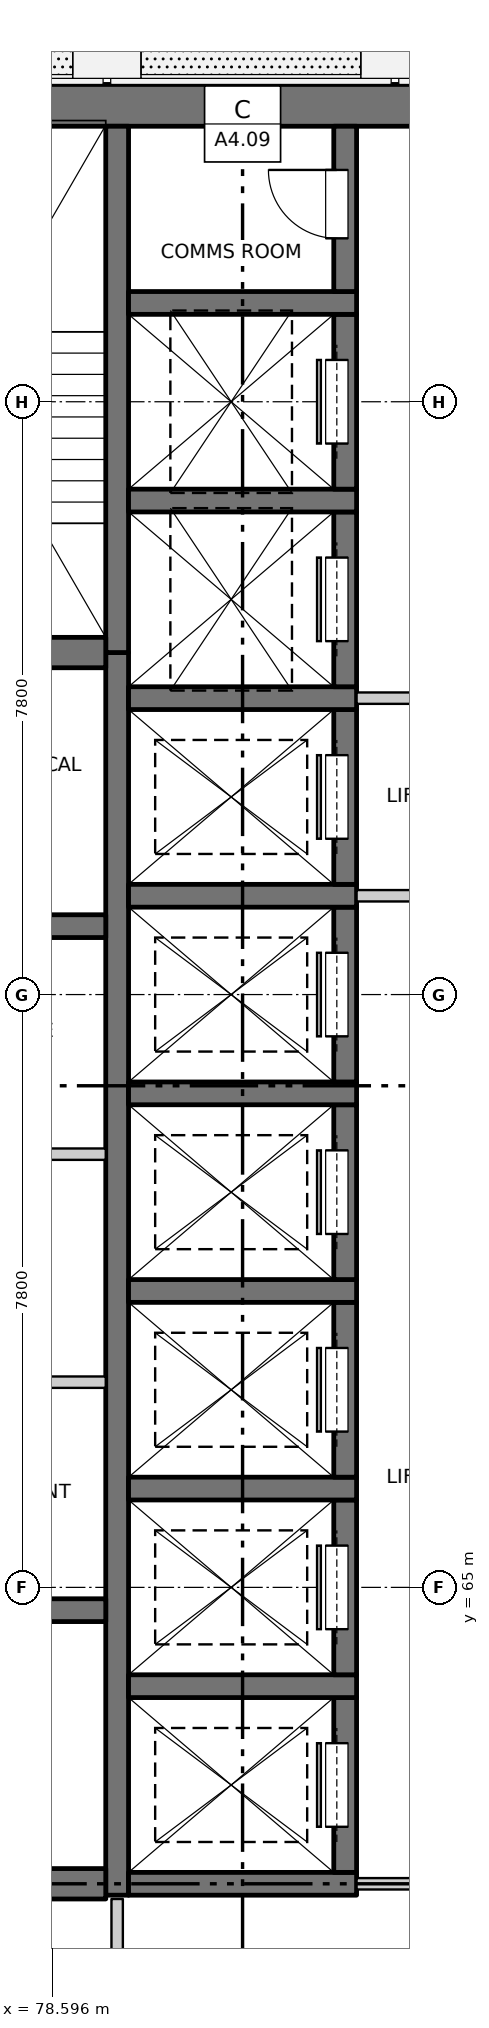
"""IFC4 building model, lengths in metres.
Left out: names, types, materials, properties, quantities, classifications, styles, units other than length and angle.
Written with IfcOpenShell. Run it as: python <this file> out.ifc"""

import sys

from ifc_helpers import new_model, si_unit, direction, frame, frame_2d, origin, place, context, subcontext, project, spatial, rectangle, extrude, element, fill, save


model = new_model("IFC4")
c1 = context("Model", 3, precision=1e-05, world=origin(), true_north=direction((0.0, 1.0)))
c2 = subcontext(c1, "Body", "Model", "MODEL_VIEW")
j1 = project(units=[si_unit("LENGTHUNIT", "METRE"), si_unit("PLANEANGLEUNIT", "RADIAN")], contexts=[c1])
p1 = place(None, origin())
s1 = spatial("IfcSite", under=j1, at=p1, CompositionType="ELEMENT")
p2 = place(p1, origin())
s2 = spatial("IfcBuilding", under=s1, at=p2, CompositionType="ELEMENT")
p3 = place(p2, frame((0.0, 0.0, 103.3)))
s3 = spatial("IfcBuildingStorey", under=s2, at=p3, CompositionType="ELEMENT", Elevation=103.3)
p4 = place(p3, frame((75.525, 84.5, -0.25), z_axis=(0.0, 0.0, 1.0), x_axis=(1.0, 0.0, 0.0)))
e1 = element("IfcWall", 1, at=p4, inside=s3, PredefinedType="SOLIDWALL", context=c2, shape_type="SweptSolid", body=[
    extrude(rectangle(XDim=18.95, YDim=0.55, at=frame_2d((9.475, 0.0))), origin(), (0.0, 0.0, 1.0), 3.4),
])
p5 = place(p3, frame((79.45, 60.95, -0.25), z_axis=(0.0, 0.0, 1.0), x_axis=(0.0, 1.0, 0.0)))
e2 = element("IfcWall", 2, at=p5, inside=s3, PredefinedType="SOLIDWALL", context=c2, shape_type="SweptSolid", body=[
    extrude(rectangle(XDim=16.35, YDim=0.3, at=frame_2d((8.175, 0.0))), origin(), (0.0, 0.0, 1.0), 3.4),
])
p6 = place(p3, frame((79.45, 77.3, -0.25), z_axis=(0.0, 0.0, 1.0), x_axis=(0.0, 1.0, 0.0)))
e3 = element("IfcWall", 3, at=p6, inside=s3, PredefinedType="SOLIDWALL", context=c2, shape_type="SweptSolid", body=[
    extrude(rectangle(XDim=6.925, YDim=0.3, at=frame_2d((3.462, 0.0))), origin(), (0.0, 0.0, 1.0), 3.4),
])
p7 = place(p3, frame((79.6, 61.1, -0.25), z_axis=(0.0, 0.0, 1.0), x_axis=(1.0, 0.0, 0.0)))
e4 = element("IfcWall", 4, at=p7, inside=s3, PredefinedType="SOLIDWALL", context=c2, shape_type="SweptSolid", body=[
    extrude(rectangle(XDim=3.0, YDim=0.3, at=frame_2d((1.5, 0.0))), origin(), (0.0, 0.0, 1.0), 3.4),
])
p8 = place(p3, frame((82.45, 61.25, -0.25), z_axis=(0.0, 0.0, 1.0), x_axis=(0.0, 1.0, 0.0)))
e5 = element("IfcWall", 5, at=p8, inside=s3, PredefinedType="SOLIDWALL", context=c2, shape_type="SweptSolid", body=[
    extrude(rectangle(XDim=2.3, YDim=0.3, at=frame_2d((1.15, 0.0))), origin(), (0.0, 0.0, 1.0), 3.4),
])
p9 = place(p8, frame((0.6, 0.0, 0.25)))
e6 = element("IfcOpeningElement", 6, at=p9, cuts=e5, PredefinedType="OPENING", context=c2, shape_type="SweptSolid", body=[
    extrude(rectangle(XDim=1.1, YDim=2.1, at=frame_2d((0.55, 1.05))), frame((0.0, 0.16, 0.0), z_axis=(0.0, -1.0, 0.0), x_axis=(1.0, 0.0, 0.0)), (0.0, 0.0, 1.0), 0.32),
])
p10 = place(p3, frame((79.6, 63.7, -0.25), z_axis=(0.0, 0.0, 1.0), x_axis=(1.0, 0.0, 0.0)))
e7 = element("IfcWall", 7, at=p10, inside=s3, PredefinedType="SOLIDWALL", context=c2, shape_type="SweptSolid", body=[
    extrude(rectangle(XDim=3.0, YDim=0.3, at=frame_2d((1.5, 0.0))), origin(), (0.0, 0.0, 1.0), 3.4),
])
p11 = place(p3, frame((82.45, 63.85, -0.25), z_axis=(0.0, 0.0, 1.0), x_axis=(0.0, 1.0, 0.0)))
e8 = element("IfcWall", 8, at=p11, inside=s3, PredefinedType="SOLIDWALL", context=c2, shape_type="SweptSolid", body=[
    extrude(rectangle(XDim=2.3, YDim=0.3, at=frame_2d((1.15, 0.0))), origin(), (0.0, 0.0, 1.0), 3.4),
])
p12 = place(p11, frame((0.6, 0.0, 0.25)))
e9 = element("IfcOpeningElement", 9, at=p12, cuts=e8, PredefinedType="OPENING", context=c2, shape_type="SweptSolid", body=[
    extrude(rectangle(XDim=1.1, YDim=2.1, at=frame_2d((0.55, 1.05))), frame((0.0, 0.16, 0.0), z_axis=(0.0, -1.0, 0.0), x_axis=(1.0, 0.0, 0.0)), (0.0, 0.0, 1.0), 0.32),
])
p13 = place(p3, frame((79.6, 66.3, -0.25), z_axis=(0.0, 0.0, 1.0), x_axis=(1.0, 0.0, 0.0)))
e10 = element("IfcWall", 10, at=p13, inside=s3, PredefinedType="SOLIDWALL", context=c2, shape_type="SweptSolid", body=[
    extrude(rectangle(XDim=3.0, YDim=0.3, at=frame_2d((1.5, 0.0))), origin(), (0.0, 0.0, 1.0), 3.4),
])
p14 = place(p3, frame((82.45, 66.45, -0.25), z_axis=(0.0, 0.0, 1.0), x_axis=(0.0, 1.0, 0.0)))
e11 = element("IfcWall", 11, at=p14, inside=s3, PredefinedType="SOLIDWALL", context=c2, shape_type="SweptSolid", body=[
    extrude(rectangle(XDim=2.3, YDim=0.3, at=frame_2d((1.15, 0.0))), origin(), (0.0, 0.0, 1.0), 3.4),
])
p15 = place(p14, frame((0.6, 0.0, 0.25)))
e12 = element("IfcOpeningElement", 12, at=p15, cuts=e11, PredefinedType="OPENING", context=c2, shape_type="SweptSolid", body=[
    extrude(rectangle(XDim=1.1, YDim=2.1, at=frame_2d((0.55, 1.05))), frame((0.0, 0.16, 0.0), z_axis=(0.0, -1.0, 0.0), x_axis=(1.0, 0.0, 0.0)), (0.0, 0.0, 1.0), 0.32),
])
p16 = place(p3, frame((79.6, 68.9, -0.25), z_axis=(0.0, 0.0, 1.0), x_axis=(1.0, 0.0, 0.0)))
e13 = element("IfcWall", 13, at=p16, inside=s3, PredefinedType="SOLIDWALL", context=c2, shape_type="SweptSolid", body=[
    extrude(rectangle(XDim=3.0, YDim=0.3, at=frame_2d((1.5, 0.0))), origin(), (0.0, 0.0, 1.0), 3.4),
])
p17 = place(p3, frame((82.45, 69.05, -0.25), z_axis=(0.0, 0.0, 1.0), x_axis=(0.0, 1.0, 0.0)))
e14 = element("IfcWall", 14, at=p17, inside=s3, PredefinedType="SOLIDWALL", context=c2, shape_type="SweptSolid", body=[
    extrude(rectangle(XDim=2.3, YDim=0.3, at=frame_2d((1.15, 0.0))), origin(), (0.0, 0.0, 1.0), 3.4),
])
p18 = place(p17, frame((0.6, 0.0, 0.25)))
e15 = element("IfcOpeningElement", 15, at=p18, cuts=e14, PredefinedType="OPENING", context=c2, shape_type="SweptSolid", body=[
    extrude(rectangle(XDim=1.1, YDim=2.1, at=frame_2d((0.55, 1.05))), frame((0.0, 0.16, 0.0), z_axis=(0.0, -1.0, 0.0), x_axis=(1.0, 0.0, 0.0)), (0.0, 0.0, 1.0), 0.32),
])
p19 = place(p3, frame((79.6, 71.5, -0.25), z_axis=(0.0, 0.0, 1.0), x_axis=(1.0, 0.0, 0.0)))
e16 = element("IfcWall", 16, at=p19, inside=s3, PredefinedType="SOLIDWALL", context=c2, shape_type="SweptSolid", body=[
    extrude(rectangle(XDim=3.0, YDim=0.3, at=frame_2d((1.5, 0.0))), origin(), (0.0, 0.0, 1.0), 3.4),
])
p20 = place(p3, frame((82.45, 71.65, -0.25), z_axis=(0.0, 0.0, 1.0), x_axis=(0.0, 1.0, 0.0)))
e17 = element("IfcWall", 17, at=p20, inside=s3, PredefinedType="SOLIDWALL", context=c2, shape_type="SweptSolid", body=[
    extrude(rectangle(XDim=2.3, YDim=0.3, at=frame_2d((1.15, 0.0))), origin(), (0.0, 0.0, 1.0), 3.4),
])
p21 = place(p20, frame((0.6, 0.0, 0.25)))
e18 = element("IfcOpeningElement", 18, at=p21, cuts=e17, PredefinedType="OPENING", context=c2, shape_type="SweptSolid", body=[
    extrude(rectangle(XDim=1.1, YDim=2.1, at=frame_2d((0.55, 1.05))), frame((0.0, 0.16, 0.0), z_axis=(0.0, -1.0, 0.0), x_axis=(1.0, 0.0, 0.0)), (0.0, 0.0, 1.0), 0.32),
])
p22 = place(p3, frame((79.6, 74.1, -0.25), z_axis=(0.0, 0.0, 1.0), x_axis=(1.0, 0.0, 0.0)))
e19 = element("IfcWall", 19, at=p22, inside=s3, PredefinedType="SOLIDWALL", context=c2, shape_type="SweptSolid", body=[
    extrude(rectangle(XDim=3.0, YDim=0.3, at=frame_2d((1.5, 0.0))), origin(), (0.0, 0.0, 1.0), 3.4),
])
p23 = place(p3, frame((82.45, 74.25, -0.25), z_axis=(0.0, 0.0, 1.0), x_axis=(0.0, 1.0, 0.0)))
e20 = element("IfcWall", 20, at=p23, inside=s3, PredefinedType="SOLIDWALL", context=c2, shape_type="SweptSolid", body=[
    extrude(rectangle(XDim=2.3, YDim=0.3, at=frame_2d((1.15, 0.0))), origin(), (0.0, 0.0, 1.0), 3.4),
])
p24 = place(p23, frame((0.6, 0.0, 0.25)))
e21 = element("IfcOpeningElement", 21, at=p24, cuts=e20, PredefinedType="OPENING", context=c2, shape_type="SweptSolid", body=[
    extrude(rectangle(XDim=1.1, YDim=2.1, at=frame_2d((0.55, 1.05))), frame((0.0, 0.16, 0.0), z_axis=(0.0, -1.0, 0.0), x_axis=(1.0, 0.0, 0.0)), (0.0, 0.0, 1.0), 0.32),
])
p25 = place(p3, frame((79.6, 76.7, -0.25), z_axis=(0.0, 0.0, 1.0), x_axis=(1.0, 0.0, 0.0)))
e22 = element("IfcWall", 22, at=p25, inside=s3, PredefinedType="SOLIDWALL", context=c2, shape_type="SweptSolid", body=[
    extrude(rectangle(XDim=3.0, YDim=0.3, at=frame_2d((1.5, 0.0))), origin(), (0.0, 0.0, 1.0), 3.4),
])
p26 = place(p3, frame((82.45, 76.85, -0.25), z_axis=(0.0, 0.0, 1.0), x_axis=(0.0, 1.0, 0.0)))
e23 = element("IfcWall", 23, at=p26, inside=s3, PredefinedType="SOLIDWALL", context=c2, shape_type="SweptSolid", body=[
    extrude(rectangle(XDim=2.3, YDim=0.3, at=frame_2d((1.15, 0.0))), origin(), (0.0, 0.0, 1.0), 3.4),
])
p27 = place(p26, frame((0.6, 0.0, 0.25)))
e24 = element("IfcOpeningElement", 24, at=p27, cuts=e23, PredefinedType="OPENING", context=c2, shape_type="SweptSolid", body=[
    extrude(rectangle(XDim=1.1, YDim=2.1, at=frame_2d((0.55, 1.05))), frame((0.0, 0.16, 0.0), z_axis=(0.0, -1.0, 0.0), x_axis=(1.0, 0.0, 0.0)), (0.0, 0.0, 1.0), 0.32),
])
p28 = place(p3, frame((79.6, 79.3, -0.25), z_axis=(0.0, 0.0, 1.0), x_axis=(1.0, 0.0, 0.0)))
e25 = element("IfcWall", 25, at=p28, inside=s3, PredefinedType="SOLIDWALL", context=c2, shape_type="SweptSolid", body=[
    extrude(rectangle(XDim=3.0, YDim=0.3, at=frame_2d((1.5, 0.0))), origin(), (0.0, 0.0, 1.0), 3.4),
])
p29 = place(p3, frame((82.45, 79.45, -0.25), z_axis=(0.0, 0.0, 1.0), x_axis=(0.0, 1.0, 0.0)))
e26 = element("IfcWall", 26, at=p29, inside=s3, PredefinedType="SOLIDWALL", context=c2, shape_type="SweptSolid", body=[
    extrude(rectangle(XDim=2.3, YDim=0.3, at=frame_2d((1.15, 0.0))), origin(), (0.0, 0.0, 1.0), 3.4),
])
p30 = place(p29, frame((0.6, 0.0, 0.25)))
e27 = element("IfcOpeningElement", 27, at=p30, cuts=e26, PredefinedType="OPENING", context=c2, shape_type="SweptSolid", body=[
    extrude(rectangle(XDim=1.1, YDim=2.1, at=frame_2d((0.55, 1.05))), frame((0.0, 0.16, 0.0), z_axis=(0.0, -1.0, 0.0), x_axis=(1.0, 0.0, 0.0)), (0.0, 0.0, 1.0), 0.32),
])
p31 = place(p3, frame((79.6, 81.9, -0.25), z_axis=(0.0, 0.0, 1.0), x_axis=(1.0, 0.0, 0.0)))
e28 = element("IfcWall", 28, at=p31, inside=s3, PredefinedType="SOLIDWALL", context=c2, shape_type="SweptSolid", body=[
    extrude(rectangle(XDim=3.0, YDim=0.3, at=frame_2d((1.5, 0.0))), origin(), (0.0, 0.0, 1.0), 3.4),
])
p32 = place(p3, frame((82.45, 82.05, -0.25), z_axis=(0.0, 0.0, 1.0), x_axis=(0.0, 1.0, 0.0)))
e29 = element("IfcWall", 29, at=p32, inside=s3, PredefinedType="SOLIDWALL", context=c2, shape_type="SweptSolid", body=[
    extrude(rectangle(XDim=2.175, YDim=0.3, at=frame_2d((1.087, 0.0))), origin(), (0.0, 0.0, 1.0), 3.4),
])
p33 = place(p32, frame((0.7, 0.0, 0.25)))
e30 = element("IfcOpeningElement", 30, at=p33, cuts=e29, PredefinedType="OPENING", context=c2, shape_type="SweptSolid", body=[
    extrude(rectangle(XDim=0.9, YDim=2.1, at=frame_2d((0.45, 1.05))), frame((0.0, 0.16, 0.0), z_axis=(0.0, -1.0, 0.0), x_axis=(1.0, 0.0, 0.0)), (0.0, 0.0, 1.0), 0.32),
])
p34 = place(p3, frame((75.525, 61.1, -0.25), z_axis=(0.0, 0.0, 1.0), x_axis=(1.0, 0.0, 0.0)))
e31 = element("IfcWall", 31, at=p34, inside=s3, PredefinedType="SOLIDWALL", context=c2, shape_type="SweptSolid", body=[
    extrude(rectangle(XDim=3.775, YDim=0.4, at=frame_2d((1.888, 0.0))), origin(), (0.0, 0.0, 1.0), 3.4),
])
for number, where, z_axis, x_axis in (
    (32, (75.525, 64.7, -0.25), (0.0, 0.0, 1.0), (1.0, 0.0, 0.0)),
    (33, (75.525, 73.7, -0.25), (0.0, 0.0, 1.0), (1.0, 0.0, 0.0)),
):
    element("IfcWall", number, at=place(p3, frame(where, z_axis=z_axis, x_axis=x_axis)), inside=s3, PredefinedType="SOLIDWALL", context=c2, shape_type="SweptSolid", body=[
        extrude(rectangle(XDim=3.775, YDim=0.3, at=frame_2d((1.888, 0.0))), origin(), (0.0, 0.0, 1.0), 3.4),
    ])
p35 = place(p3, frame((75.525, 77.3, -0.25), z_axis=(0.0, 0.0, 1.0), x_axis=(1.0, 0.0, 0.0)))
e34 = element("IfcWall", 34, at=p35, inside=s3, PredefinedType="SOLIDWALL", context=c2, shape_type="SweptSolid", body=[
    extrude(rectangle(XDim=3.775, YDim=0.4, at=frame_2d((1.888, 0.0))), origin(), (0.0, 0.0, 1.0), 3.4),
])
p36 = place(p3, frame((82.6, 61.1, 0.0), z_axis=(0.0, 0.0, 1.0), x_axis=(1.0, 0.0, 0.0)))
e35 = element("IfcWall", 35, at=p36, inside=s3, PredefinedType="PARTITIONING", context=c2, shape_type="SweptSolid", body=[
    extrude(rectangle(XDim=4.8, YDim=0.15, at=frame_2d((2.4, 0.0))), origin(), (0.0, 0.0, 1.0), 3.15),
])
p37 = place(p36, frame((1.5, 0.0, 0.0)))
e36 = element("IfcOpeningElement", 36, at=p37, cuts=e35, PredefinedType="OPENING", context=c2, shape_type="SweptSolid", body=[
    extrude(rectangle(XDim=1.8, YDim=2.1, at=frame_2d((0.9, 1.05))), frame((0.0, 0.085, 0.0), z_axis=(0.0, -1.0, 0.0), x_axis=(1.0, 0.0, 0.0)), (0.0, 0.0, 1.0), 0.17),
])
for number, where, z_axis, x_axis in (
    (37, (75.525, 67.7, 0.0), (0.0, 0.0, 1.0), (1.0, 0.0, 0.0)),
    (38, (75.525, 70.7, 0.0), (0.0, 0.0, 1.0), (1.0, 0.0, 0.0)),
):
    element("IfcWall", number, at=place(p3, frame(where, z_axis=z_axis, x_axis=x_axis)), inside=s3, PredefinedType="PARTITIONING", context=c2, shape_type="SweptSolid", body=[
        extrude(rectangle(XDim=3.775, YDim=0.15, at=frame_2d((1.887, 0.0))), origin(), (0.0, 0.0, 1.0), 3.15),
    ])
p38 = place(p3, frame((82.6, 74.1, 0.0), z_axis=(0.0, 0.0, 1.0), x_axis=(1.0, 0.0, 0.0)))
e39 = element("IfcWall", 39, at=p38, inside=s3, PredefinedType="PARTITIONING", context=c2, shape_type="SweptSolid", body=[
    extrude(rectangle(XDim=4.8, YDim=0.15, at=frame_2d((2.4, 0.0))), origin(), (0.0, 0.0, 1.0), 3.15),
])
p39 = place(p38, frame((1.5, 0.0, 0.0)))
e40 = element("IfcOpeningElement", 40, at=p39, cuts=e39, PredefinedType="OPENING", context=c2, shape_type="SweptSolid", body=[
    extrude(rectangle(XDim=1.8, YDim=2.1, at=frame_2d((0.9, 1.05))), frame((0.0, 0.085, 0.0), z_axis=(0.0, -1.0, 0.0), x_axis=(1.0, 0.0, 0.0)), (0.0, 0.0, 1.0), 0.17),
])
p40 = place(p3, frame((82.6, 76.7, 0.0), z_axis=(0.0, 0.0, 1.0), x_axis=(1.0, 0.0, 0.0)))
e41 = element("IfcWall", 41, at=p40, inside=s3, PredefinedType="PARTITIONING", context=c2, shape_type="SweptSolid", body=[
    extrude(rectangle(XDim=4.8, YDim=0.15, at=frame_2d((2.4, 0.0))), origin(), (0.0, 0.0, 1.0), 3.15),
])
p41 = place(p40, frame((1.5, 0.0, 0.0)))
e42 = element("IfcOpeningElement", 42, at=p41, cuts=e41, PredefinedType="OPENING", context=c2, shape_type="SweptSolid", body=[
    extrude(rectangle(XDim=1.8, YDim=2.1, at=frame_2d((0.9, 1.05))), frame((0.0, 0.085, 0.0), z_axis=(0.0, -1.0, 0.0), x_axis=(1.0, 0.0, 0.0)), (0.0, 0.0, 1.0), 0.17),
])
p42 = place(p3, frame((79.45, 55.525, 0.0), z_axis=(0.0, 0.0, 1.0), x_axis=(0.0, 1.0, 0.0)))
e43 = element("IfcWall", 43, at=p42, inside=s3, PredefinedType="PARTITIONING", context=c2, shape_type="SweptSolid", body=[
    extrude(rectangle(XDim=5.375, YDim=0.15, at=frame_2d((2.688, 0.0))), origin(), (0.0, 0.0, 1.0), 3.15),
])
p43 = place(p42, frame((2.175, 0.0, 0.0)))
e44 = element("IfcOpeningElement", 44, at=p43, cuts=e43, PredefinedType="OPENING", context=c2, shape_type="SweptSolid", body=[
    extrude(rectangle(XDim=0.9, YDim=2.1, at=frame_2d((0.45, 1.05))), frame((0.0, 0.085, 0.0), z_axis=(0.0, -1.0, 0.0), x_axis=(1.0, 0.0, 0.0)), (0.0, 0.0, 1.0), 0.17),
])
p44 = place(p9, origin())
e45 = element("IfcDoor", 45, at=p44, inside=s3, OperationType="SLIDING_TO_RIGHT", PredefinedType="DOOR", context=c2, shape_type="SweptSolid", body=[
    extrude(rectangle(XDim=1.1, YDim=2.1, at=frame_2d((0.55, 1.05))), frame((0.0, 0.135, 0.0), z_axis=(0.0, -1.0, 0.0), x_axis=(1.0, 0.0, 0.0)), (0.0, 0.0, 1.0), 0.05),
])
fill(e6, e45)
p45 = place(p12, origin())
e46 = element("IfcDoor", 46, at=p45, inside=s3, OperationType="SLIDING_TO_RIGHT", PredefinedType="DOOR", context=c2, shape_type="SweptSolid", body=[
    extrude(rectangle(XDim=1.1, YDim=2.1, at=frame_2d((0.55, 1.05))), frame((0.0, 0.135, 0.0), z_axis=(0.0, -1.0, 0.0), x_axis=(1.0, 0.0, 0.0)), (0.0, 0.0, 1.0), 0.05),
])
fill(e9, e46)
p46 = place(p15, origin())
e47 = element("IfcDoor", 47, at=p46, inside=s3, OperationType="SLIDING_TO_RIGHT", PredefinedType="DOOR", context=c2, shape_type="SweptSolid", body=[
    extrude(rectangle(XDim=1.1, YDim=2.1, at=frame_2d((0.55, 1.05))), frame((0.0, 0.135, 0.0), z_axis=(0.0, -1.0, 0.0), x_axis=(1.0, 0.0, 0.0)), (0.0, 0.0, 1.0), 0.05),
])
fill(e12, e47)
p47 = place(p18, origin())
e48 = element("IfcDoor", 48, at=p47, inside=s3, OperationType="SLIDING_TO_LEFT", PredefinedType="DOOR", context=c2, shape_type="SweptSolid", body=[
    extrude(rectangle(XDim=1.1, YDim=2.1, at=frame_2d((0.55, 1.05))), frame((0.0, 0.135, 0.0), z_axis=(0.0, -1.0, 0.0), x_axis=(1.0, 0.0, 0.0)), (0.0, 0.0, 1.0), 0.05),
])
fill(e15, e48)
p48 = place(p21, origin())
e49 = element("IfcDoor", 49, at=p48, inside=s3, OperationType="SLIDING_TO_LEFT", PredefinedType="DOOR", context=c2, shape_type="SweptSolid", body=[
    extrude(rectangle(XDim=1.1, YDim=2.1, at=frame_2d((0.55, 1.05))), frame((0.0, 0.135, 0.0), z_axis=(0.0, -1.0, 0.0), x_axis=(1.0, 0.0, 0.0)), (0.0, 0.0, 1.0), 0.05),
])
fill(e18, e49)
p49 = place(p24, origin())
e50 = element("IfcDoor", 50, at=p49, inside=s3, OperationType="SLIDING_TO_LEFT", PredefinedType="DOOR", context=c2, shape_type="SweptSolid", body=[
    extrude(rectangle(XDim=1.1, YDim=2.1, at=frame_2d((0.55, 1.05))), frame((0.0, 0.135, 0.0), z_axis=(0.0, -1.0, 0.0), x_axis=(1.0, 0.0, 0.0)), (0.0, 0.0, 1.0), 0.05),
])
fill(e21, e50)
p50 = place(p27, origin())
e51 = element("IfcDoor", 51, at=p50, inside=s3, OperationType="SLIDING_TO_LEFT", PredefinedType="DOOR", context=c2, shape_type="SweptSolid", body=[
    extrude(rectangle(XDim=1.1, YDim=2.1, at=frame_2d((0.55, 1.05))), frame((0.0, 0.135, 0.0), z_axis=(0.0, -1.0, 0.0), x_axis=(1.0, 0.0, 0.0)), (0.0, 0.0, 1.0), 0.05),
])
fill(e24, e51)
p51 = place(p30, origin())
e52 = element("IfcDoor", 52, at=p51, inside=s3, OperationType="SLIDING_TO_LEFT", PredefinedType="DOOR", context=c2, shape_type="SweptSolid", body=[
    extrude(rectangle(XDim=1.1, YDim=2.1, at=frame_2d((0.55, 1.05))), frame((0.0, 0.135, 0.0), z_axis=(0.0, -1.0, 0.0), x_axis=(1.0, 0.0, 0.0)), (0.0, 0.0, 1.0), 0.05),
])
fill(e27, e52)
p52 = place(p33, origin())
e53 = element("IfcDoor", 53, at=p52, inside=s3, OperationType="SINGLE_SWING_RIGHT", PredefinedType="DOOR", context=c2, shape_type="SweptSolid", body=[
    extrude(rectangle(XDim=0.9, YDim=2.1, at=frame_2d((0.45, 1.05))), frame((0.0, 0.135, 0.0), z_axis=(0.0, -1.0, 0.0), x_axis=(1.0, 0.0, 0.0)), (0.0, 0.0, 1.0), 0.05),
])
fill(e30, e53)
save(model, sys.argv[1])
